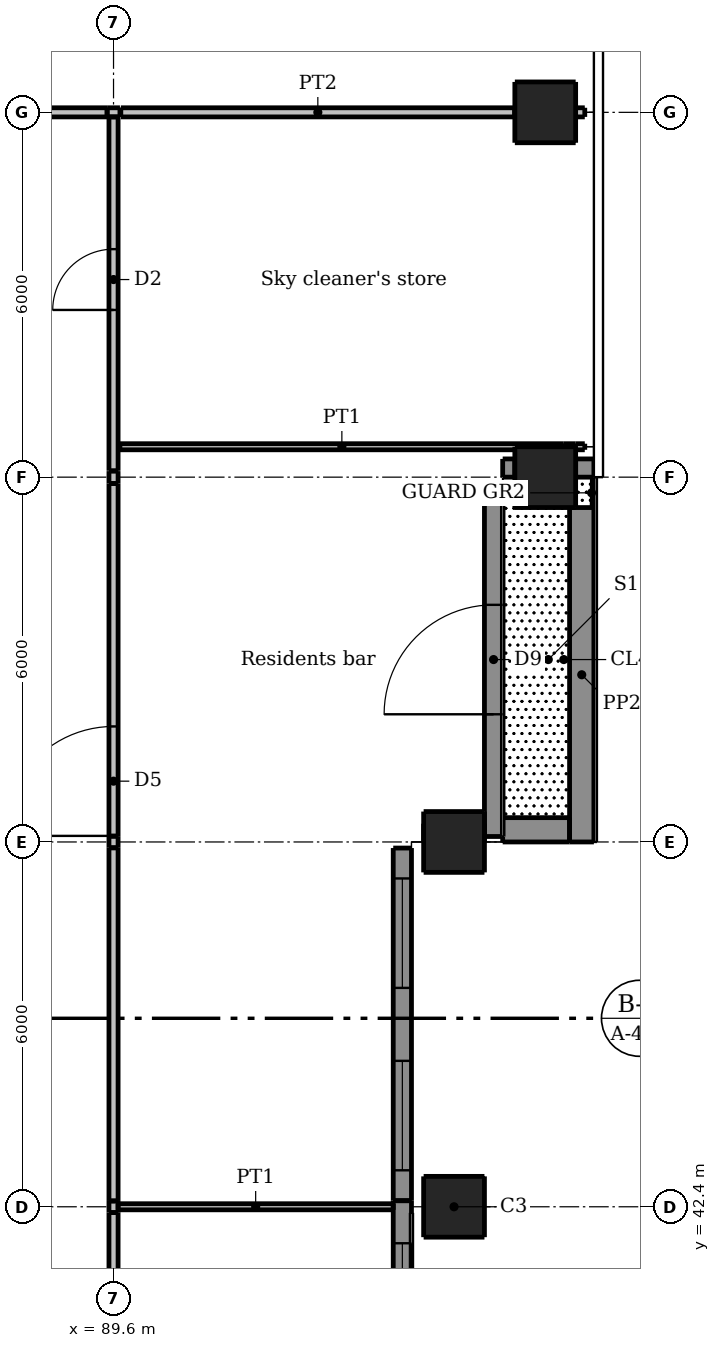
"""IFC4 building model, lengths in metres.
Left out: names, types, materials, properties, quantities, classifications, styles, units other than length and angle.
Written with IfcOpenShell. Run it as: python <this file> out.ifc"""

import sys

from ifc_helpers import new_model, si_unit, direction, frame, frame_2d, origin, origin_2d, place, context, subcontext, project, spatial, rectangle, extrude, element, fill, save


model = new_model("IFC4")
c1 = context("Model", 3, precision=1e-05, world=origin(), true_north=direction((0.0, 1.0)))
c2 = subcontext(c1, "Body", "Model", "MODEL_VIEW")
j1 = project(units=[si_unit("LENGTHUNIT", "METRE"), si_unit("PLANEANGLEUNIT", "RADIAN")], contexts=[c1])
p1 = place(None, origin())
s1 = spatial("IfcSite", under=j1, at=p1, CompositionType="ELEMENT")
p2 = place(p1, origin())
s2 = spatial("IfcBuilding", under=s1, at=p2, CompositionType="ELEMENT")
p3 = place(p2, frame((0.0, 0.0, 150.4)))
s3 = spatial("IfcBuildingStorey", under=s2, at=p3, CompositionType="ELEMENT", Elevation=150.4)
for number, where, z_axis, x_axis in (
    (1, (95.2, 42.4, 0.0), (0.0, 0.0, 1.0), (1.0, 0.0, 0.0)),
    (2, (95.2, 48.4, 0.0), (0.0, 0.0, 1.0), (1.0, 0.0, 0.0)),
    (3, (96.7, 54.4, 0.0), (0.0, 0.0, 1.0), (1.0, 0.0, 0.0)),
    (4, (96.7, 60.4, 0.0), (0.0, 0.0, 1.0), (1.0, 0.0, 0.0)),
):
    element("IfcColumn", number, at=place(p3, frame(where, z_axis=z_axis, x_axis=x_axis)), inside=s3, PredefinedType="COLUMN", context=c2, shape_type="SweptSolid", body=[
        extrude(rectangle(XDim=1.0, YDim=1.0, at=origin_2d()), origin(), (0.0, 0.0, 1.0), 4.25),
    ])
p4 = place(p3, frame((96.0, 54.55, 0.0), z_axis=(0.0, 0.0, 1.0), x_axis=(1.0, 0.0, 0.0)))
e5 = element("IfcWall", 5, at=p4, inside=s3, PredefinedType="SOLIDWALL", context=c2, shape_type="SweptSolid", body=[
    extrude(rectangle(XDim=0.2, YDim=0.3, at=frame_2d((0.1, 0.0))), origin(), (0.0, 0.0, 1.0), 4.25),
])
p5 = place(p3, frame((97.2, 54.55, 0.0), z_axis=(0.0, 0.0, 1.0), x_axis=(1.0, 0.0, 0.0)))
e6 = element("IfcWall", 6, at=p5, inside=s3, PredefinedType="SOLIDWALL", context=c2, shape_type="SweptSolid", body=[
    extrude(rectangle(XDim=0.3, YDim=0.3, at=frame_2d((0.15, 0.0))), origin(), (0.0, 0.0, 1.0), 4.25),
])
p6 = place(p3, frame((94.35, 36.4, 0.0), z_axis=(0.0, 0.0, 1.0), x_axis=(0.0, 1.0, 0.0)))
e7 = element("IfcWall", 7, at=p6, inside=s3, PredefinedType="SOLIDWALL", context=c2, shape_type="SweptSolid", body=[
    extrude(rectangle(XDim=6.1, YDim=0.3, at=frame_2d((3.05, 0.0))), origin(), (0.0, 0.0, 1.0), 4.25),
])
p7 = place(p6, frame((0.6, 0.0, 0.15)))
e8 = element("IfcOpeningElement", 8, at=p7, cuts=e7, PredefinedType="OPENING", context=c2, shape_type="SweptSolid", body=[
    extrude(rectangle(XDim=1.8, YDim=2.1, at=frame_2d((0.9, 1.05))), frame((0.0, 0.16, 0.0), z_axis=(0.0, -1.0, 0.0), x_axis=(1.0, 0.0, 0.0)), (0.0, 0.0, 1.0), 0.32),
])
p8 = place(p6, frame((3.6, 0.0, 0.15)))
e9 = element("IfcOpeningElement", 9, at=p8, cuts=e7, PredefinedType="OPENING", context=c2, shape_type="SweptSolid", body=[
    extrude(rectangle(XDim=1.8, YDim=2.1, at=frame_2d((0.9, 1.05))), frame((0.0, 0.16, 0.0), z_axis=(0.0, -1.0, 0.0), x_axis=(1.0, 0.0, 0.0)), (0.0, 0.0, 1.0), 0.32),
])
p9 = place(p3, frame((94.35, 42.5, 0.0), z_axis=(0.0, 0.0, 1.0), x_axis=(0.0, 1.0, 0.0)))
e10 = element("IfcWall", 10, at=p9, inside=s3, PredefinedType="SOLIDWALL", context=c2, shape_type="SweptSolid", body=[
    extrude(rectangle(XDim=5.8, YDim=0.3, at=frame_2d((2.9, 0.0))), origin(), (0.0, 0.0, 1.0), 4.25),
])
p10 = place(p9, frame((0.5, 0.0, 0.15)))
e11 = element("IfcOpeningElement", 11, at=p10, cuts=e10, PredefinedType="OPENING", context=c2, shape_type="SweptSolid", body=[
    extrude(rectangle(XDim=1.8, YDim=2.1, at=frame_2d((0.9, 1.05))), frame((0.0, 0.16, 0.0), z_axis=(0.0, -1.0, 0.0), x_axis=(1.0, 0.0, 0.0)), (0.0, 0.0, 1.0), 0.32),
])
p11 = place(p9, frame((3.5, 0.0, 0.15)))
e12 = element("IfcOpeningElement", 12, at=p11, cuts=e10, PredefinedType="OPENING", context=c2, shape_type="SweptSolid", body=[
    extrude(rectangle(XDim=1.8, YDim=2.1, at=frame_2d((0.9, 1.05))), frame((0.0, 0.16, 0.0), z_axis=(0.0, -1.0, 0.0), x_axis=(1.0, 0.0, 0.0)), (0.0, 0.0, 1.0), 0.32),
])
p12 = place(p3, frame((94.7, 48.55, 0.0), z_axis=(0.0, 0.0, 1.0), x_axis=(1.0, 0.0, 0.0)))
e13 = element("IfcWall", 13, at=p12, inside=s3, PredefinedType="SOLIDWALL", context=c2, shape_type="SweptSolid", body=[
    extrude(rectangle(XDim=1.0, YDim=0.3, at=frame_2d((0.5, 0.0))), origin(), (0.0, 0.0, 1.0), 4.25),
])
p13 = place(p3, frame((95.85, 48.49, 0.0), z_axis=(0.0, 0.0, 1.0), x_axis=(0.0, 1.0, 0.0)))
e14 = element("IfcWall", 14, at=p13, inside=s3, PredefinedType="SOLIDWALL", context=c2, shape_type="SweptSolid", body=[
    extrude(rectangle(XDim=5.8, YDim=0.3, at=frame_2d((2.9, 0.0))), origin(), (0.0, 0.0, 1.0), 4.25),
])
p14 = place(p13, frame((2.01, 0.0, 0.0)))
e15 = element("IfcOpeningElement", 15, at=p14, cuts=e14, PredefinedType="OPENING", context=c2, shape_type="SweptSolid", body=[
    extrude(rectangle(XDim=1.8, YDim=2.4, at=frame_2d((0.9, 1.2))), frame((0.0, 0.16, 0.0), z_axis=(0.0, -1.0, 0.0), x_axis=(1.0, 0.0, 0.0)), (0.0, 0.0, 1.0), 0.32),
])
p15 = place(p3, frame((97.3, 48.4, 0.03), z_axis=(0.0, 0.0, 1.0), x_axis=(0.0, 1.0, 0.0)))
e16 = element("IfcWall", 16, at=p15, inside=s3, PredefinedType="PARAPET", context=c2, shape_type="SweptSolid", body=[
    extrude(rectangle(XDim=5.5, YDim=0.4, at=frame_2d((2.75, 0.0))), origin(), (0.0, 0.0, 1.0), 1.1),
])
p16 = place(p3, frame((96.0, 48.6, 0.03), z_axis=(0.0, 0.0, 1.0), x_axis=(1.0, 0.0, 0.0)))
e17 = element("IfcWall", 17, at=p16, inside=s3, PredefinedType="PARAPET", context=c2, shape_type="SweptSolid", body=[
    extrude(rectangle(XDim=1.1, YDim=0.4, at=frame_2d((0.55, 0.0))), origin(), (0.0, 0.0, 1.0), 1.1),
])
p17 = place(p3, frame((89.675, 42.4, 0.0), z_axis=(0.0, 0.0, 1.0), x_axis=(1.0, 0.0, 0.0)))
e18 = element("IfcWall", 18, at=p17, inside=s3, PredefinedType="PARTITIONING", context=c2, shape_type="SweptSolid", body=[
    extrude(rectangle(XDim=4.525, YDim=0.1, at=frame_2d((2.262, 0.0))), origin(), (0.0, 0.0, 1.0), 3.79),
])
p18 = place(p3, frame((89.705, 54.9, 0.0), z_axis=(0.0, 0.0, 1.0), x_axis=(1.0, 0.0, 0.0)))
e19 = element("IfcWall", 19, at=p18, inside=s3, PredefinedType="PARTITIONING", context=c2, shape_type="SweptSolid", body=[
    extrude(rectangle(XDim=7.3, YDim=0.1, at=frame_2d((3.65, 0.0))), origin(), (0.0, 0.0, 1.0), 4.25),
])
p19 = place(p3, frame((97.005, 54.9, 0.0), z_axis=(0.0, 0.0, 1.0), x_axis=(1.0, 0.0, 0.0)))
e20 = element("IfcWall", 20, at=p19, inside=s3, PredefinedType="PARTITIONING", context=c2, shape_type="SweptSolid", body=[
    extrude(rectangle(XDim=0.19, YDim=0.1, at=frame_2d((0.095, 0.0))), origin(), (0.0, 0.0, 1.0), 3.797),
])
p20 = place(p3, frame((97.195, 54.9, 0.0), z_axis=(0.0, 0.0, 1.0), x_axis=(1.0, 0.0, 0.0)))
e21 = element("IfcWall", 21, at=p20, inside=s3, PredefinedType="PARTITIONING", context=c2, shape_type="SweptSolid", body=[
    extrude(rectangle(XDim=0.155, YDim=0.1, at=frame_2d((0.078, 0.0))), origin(), (0.0, 0.0, 1.0), 4.25),
])
p21 = place(p3, frame((83.705, 60.4, 0.0), z_axis=(0.0, 0.0, 1.0), x_axis=(1.0, 0.0, 0.0)))
e22 = element("IfcWall", 22, at=p21, inside=s3, PredefinedType="PARTITIONING", context=c2, shape_type="SweptSolid", body=[
    extrude(rectangle(XDim=5.79, YDim=0.15, at=frame_2d((2.895, 0.0))), origin(), (0.0, 0.0, 1.0), 4.25),
])
p22 = place(p21, frame((2.795, 0.0, 0.0)))
e23 = element("IfcOpeningElement", 23, at=p22, cuts=e22, PredefinedType="OPENING", context=c2, shape_type="SweptSolid", body=[
    extrude(rectangle(XDim=1.0, YDim=2.1, at=frame_2d((0.5, 1.05))), frame((0.0, 0.085, 0.0), z_axis=(0.0, -1.0, 0.0), x_axis=(1.0, 0.0, 0.0)), (0.0, 0.0, 1.0), 0.17),
])
p23 = place(p3, frame((89.495, 60.4, 0.0), z_axis=(0.0, 0.0, 1.0), x_axis=(1.0, 0.0, 0.0)))
e24 = element("IfcWall", 24, at=p23, inside=s3, PredefinedType="PARTITIONING", context=c2, shape_type="SweptSolid", body=[
    extrude(rectangle(XDim=0.211, YDim=0.15, at=frame_2d((0.105, 0.0))), origin(), (0.0, 0.0, 1.0), 3.711),
])
p24 = place(p3, frame((89.72, 60.4, 0.0), z_axis=(0.0, 0.0, 1.0), x_axis=(1.0, 0.0, 0.0)))
e25 = element("IfcWall", 25, at=p24, inside=s3, PredefinedType="PARTITIONING", context=c2, shape_type="SweptSolid", body=[
    extrude(rectangle(XDim=6.48, YDim=0.15, at=frame_2d((3.24, 0.0))), origin(), (0.0, 0.0, 1.0), 3.847),
])
p25 = place(p3, frame((96.2, 60.4, 0.0), z_axis=(0.0, 0.0, 1.0), x_axis=(1.0, 0.0, 0.0)))
e26 = element("IfcWall", 26, at=p25, inside=s3, PredefinedType="PARTITIONING", context=c2, shape_type="SweptSolid", body=[
    extrude(rectangle(XDim=1.15, YDim=0.15, at=frame_2d((0.575, 0.0))), origin(), (0.0, 0.0, 1.0), 4.25),
])
p26 = place(p3, frame((89.6, 36.489, 0.0), z_axis=(0.0, 0.0, 1.0), x_axis=(0.0, 1.0, 0.0)))
e27 = element("IfcWall", 27, at=p26, inside=s3, PredefinedType="PARTITIONING", context=c2, shape_type="SweptSolid", body=[
    extrude(rectangle(XDim=5.815, YDim=0.15, at=frame_2d((2.908, 0.0))), origin(), (0.0, 0.0, 1.0), 4.25),
])
p27 = place(p26, frame((0.261, 0.0, 0.0)))
e28 = element("IfcOpeningElement", 28, at=p27, cuts=e27, PredefinedType="OPENING", context=c2, shape_type="SweptSolid", body=[
    extrude(rectangle(XDim=1.8, YDim=2.1, at=frame_2d((0.9, 1.05))), frame((0.0, 0.085, 0.0), z_axis=(0.0, -1.0, 0.0), x_axis=(1.0, 0.0, 0.0)), (0.0, 0.0, 1.0), 0.17),
])
p28 = place(p3, frame((89.6, 42.304, 0.0), z_axis=(0.0, 0.0, 1.0), x_axis=(0.0, 1.0, 0.0)))
e29 = element("IfcWall", 29, at=p28, inside=s3, PredefinedType="PARTITIONING", context=c2, shape_type="SweptSolid", body=[
    extrude(rectangle(XDim=0.191, YDim=0.15, at=frame_2d((0.096, 0.0))), origin(), (0.0, 0.0, 1.0), 3.79),
])
p29 = place(p3, frame((89.6, 42.496, 0.0), z_axis=(0.0, 0.0, 1.0), x_axis=(0.0, 1.0, 0.0)))
e30 = element("IfcWall", 30, at=p29, inside=s3, PredefinedType="PARTITIONING", context=c2, shape_type="SweptSolid", body=[
    extrude(rectangle(XDim=5.809, YDim=0.15, at=frame_2d((2.904, 0.0))), origin(), (0.0, 0.0, 1.0), 4.25),
])
p30 = place(p3, frame((89.6, 48.304, 0.0), z_axis=(0.0, 0.0, 1.0), x_axis=(0.0, 1.0, 0.0)))
e31 = element("IfcWall", 31, at=p30, inside=s3, PredefinedType="PARTITIONING", context=c2, shape_type="SweptSolid", body=[
    extrude(rectangle(XDim=0.191, YDim=0.15, at=frame_2d((0.096, 0.0))), origin(), (0.0, 0.0, 1.0), 3.79),
])
p31 = place(p3, frame((89.6, 48.496, 0.0), z_axis=(0.0, 0.0, 1.0), x_axis=(0.0, 1.0, 0.0)))
e32 = element("IfcWall", 32, at=p31, inside=s3, PredefinedType="PARTITIONING", context=c2, shape_type="SweptSolid", body=[
    extrude(rectangle(XDim=5.8, YDim=0.15, at=frame_2d((2.9, 0.0))), origin(), (0.0, 0.0, 1.0), 4.25),
])
p32 = place(p31, frame((0.004, 0.0, 0.0)))
e33 = element("IfcOpeningElement", 33, at=p32, cuts=e32, PredefinedType="OPENING", context=c2, shape_type="SweptSolid", body=[
    extrude(rectangle(XDim=1.8, YDim=2.1, at=frame_2d((0.9, 1.05))), frame((0.0, 0.085, 0.0), z_axis=(0.0, -1.0, 0.0), x_axis=(1.0, 0.0, 0.0)), (0.0, 0.0, 1.0), 0.17),
])
p33 = place(p3, frame((89.6, 54.295, 0.0), z_axis=(0.0, 0.0, 1.0), x_axis=(0.0, 1.0, 0.0)))
e34 = element("IfcWall", 34, at=p33, inside=s3, PredefinedType="PARTITIONING", context=c2, shape_type="SweptSolid", body=[
    extrude(rectangle(XDim=0.204, YDim=0.15, at=frame_2d((0.102, 0.0))), origin(), (0.0, 0.0, 1.0), 3.717),
])
p34 = place(p3, frame((89.6, 54.505, 0.0), z_axis=(0.0, 0.0, 1.0), x_axis=(0.0, 1.0, 0.0)))
e35 = element("IfcWall", 35, at=p34, inside=s3, PredefinedType="PARTITIONING", context=c2, shape_type="SweptSolid", body=[
    extrude(rectangle(XDim=5.82, YDim=0.15, at=frame_2d((2.91, 0.0))), origin(), (0.0, 0.0, 1.0), 3.711),
])
p35 = place(p34, frame((2.646, 0.0, 0.0)))
e36 = element("IfcOpeningElement", 36, at=p35, cuts=e35, PredefinedType="OPENING", context=c2, shape_type="SweptSolid", body=[
    extrude(rectangle(XDim=1.0, YDim=2.1, at=frame_2d((0.5, 1.05))), frame((0.0, 0.085, 0.0), z_axis=(0.0, -1.0, 0.0), x_axis=(1.0, 0.0, 0.0)), (0.0, 0.0, 1.0), 0.17),
])
p36 = place(p8, origin())
e37 = element("IfcWindow", 37, at=p36, inside=s3, PartitioningType="DOUBLE_PANEL_VERTICAL", PredefinedType="WINDOW", context=c2, shape_type="SweptSolid", body=[
    extrude(rectangle(XDim=1.8, YDim=2.1, at=frame_2d((0.9, 1.05))), frame((0.0, 0.03, 0.0), z_axis=(0.0, -1.0, 0.0), x_axis=(1.0, 0.0, 0.0)), (0.0, 0.0, 1.0), 0.06),
])
fill(e9, e37)
p37 = place(p10, origin())
e38 = element("IfcWindow", 38, at=p37, inside=s3, PartitioningType="DOUBLE_PANEL_VERTICAL", PredefinedType="WINDOW", context=c2, shape_type="SweptSolid", body=[
    extrude(rectangle(XDim=1.8, YDim=2.1, at=frame_2d((0.9, 1.05))), frame((0.0, 0.03, 0.0), z_axis=(0.0, -1.0, 0.0), x_axis=(1.0, 0.0, 0.0)), (0.0, 0.0, 1.0), 0.06),
])
fill(e11, e38)
p38 = place(p11, origin())
e39 = element("IfcWindow", 39, at=p38, inside=s3, PartitioningType="DOUBLE_PANEL_VERTICAL", PredefinedType="WINDOW", context=c2, shape_type="SweptSolid", body=[
    extrude(rectangle(XDim=1.8, YDim=2.1, at=frame_2d((0.9, 1.05))), frame((0.0, 0.03, 0.0), z_axis=(0.0, -1.0, 0.0), x_axis=(1.0, 0.0, 0.0)), (0.0, 0.0, 1.0), 0.06),
])
fill(e12, e39)
p39 = place(p14, origin())
e40 = element("IfcDoor", 40, at=p39, inside=s3, OperationType="DOUBLE_DOOR_SINGLE_SWING", PredefinedType="DOOR", context=c2, shape_type="SweptSolid", body=[
    extrude(rectangle(XDim=1.8, YDim=2.4, at=frame_2d((0.9, 1.2))), frame((0.0, 0.025, 0.0), z_axis=(0.0, -1.0, 0.0), x_axis=(1.0, 0.0, 0.0)), (0.0, 0.0, 1.0), 0.05),
])
fill(e15, e40)
p40 = place(p32, origin())
e41 = element("IfcDoor", 41, at=p40, inside=s3, OperationType="DOUBLE_DOOR_SINGLE_SWING", PredefinedType="DOOR", context=c2, shape_type="SweptSolid", body=[
    extrude(rectangle(XDim=1.8, YDim=2.1, at=frame_2d((0.9, 1.05))), frame((0.0, 0.025, 0.0), z_axis=(0.0, -1.0, 0.0), x_axis=(1.0, 0.0, 0.0)), (0.0, 0.0, 1.0), 0.05),
])
fill(e33, e41)
p41 = place(p35, origin())
e42 = element("IfcDoor", 42, at=p41, inside=s3, OperationType="SINGLE_SWING_LEFT", PredefinedType="DOOR", context=c2, shape_type="SweptSolid", body=[
    extrude(rectangle(XDim=1.0, YDim=2.1, at=frame_2d((0.5, 1.05))), frame((0.0, 0.025, 0.0), z_axis=(0.0, -1.0, 0.0), x_axis=(1.0, 0.0, 0.0)), (0.0, 0.0, 1.0), 0.05),
])
fill(e36, e42)
save(model, sys.argv[1])
